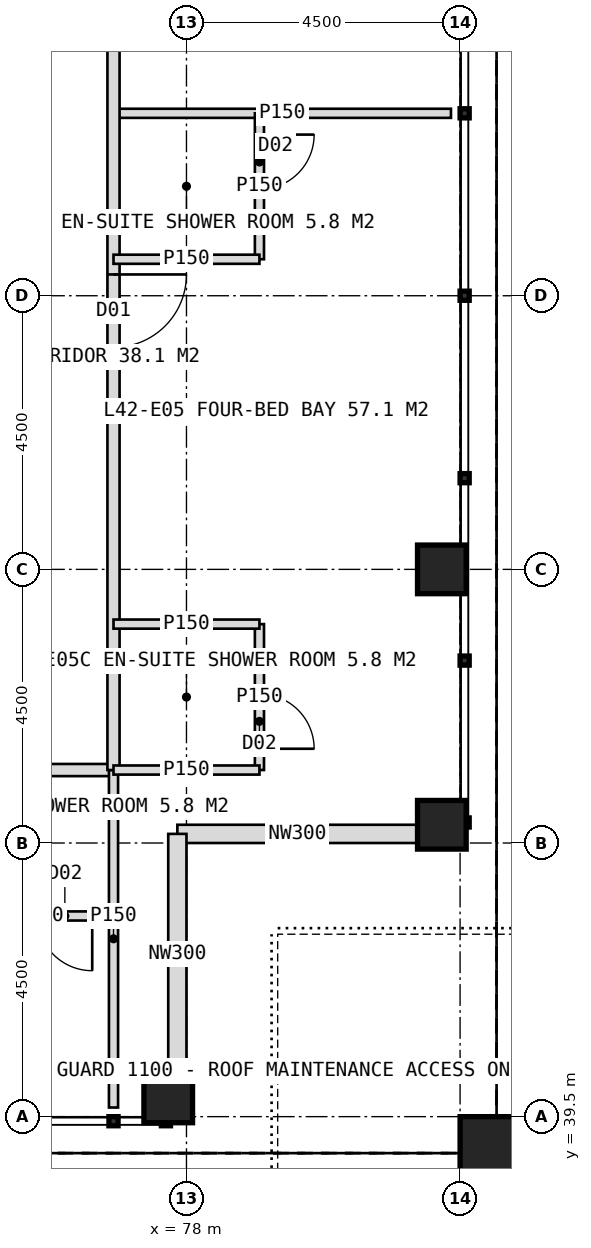
"""IFC4 building model, lengths in metres.
Left out: names, types, materials, properties, quantities, classifications, styles, units other than length and angle.
Written with IfcOpenShell. Run it as: python <this file> out.ifc"""

import sys

from ifc_helpers import new_model, si_unit, direction, frame, frame_2d, origin, origin_2d, place, context, subcontext, project, spatial, rectangle, hollow_rectangle, extrude, element, fill, save


model = new_model("IFC4")
c1 = context("Model", 3, precision=1e-05, world=origin(), true_north=direction((0.0, 1.0)))
c2 = subcontext(c1, "Body", "Model", "MODEL_VIEW")
j1 = project(units=[si_unit("LENGTHUNIT", "METRE"), si_unit("PLANEANGLEUNIT", "RADIAN")], contexts=[c1])
p1 = place(None, origin())
s1 = spatial("IfcSite", under=j1, at=p1, CompositionType="ELEMENT")
p2 = place(p1, origin())
s2 = spatial("IfcBuilding", under=s1, at=p2, CompositionType="ELEMENT")
p3 = place(p2, frame((0.0, 0.0, 177.0)))
s3 = spatial("IfcBuildingStorey", under=s2, at=p3, CompositionType="ELEMENT", Elevation=177.0)
for number, where, z_axis, x_axis in (
    (1, (82.2, 44.3, 0.0), (0.0, 0.0, 1.0), (1.0, 0.0, 0.0)),
    (2, (82.2, 48.5, 0.0), (0.0, 0.0, 1.0), (1.0, 0.0, 0.0)),
    (3, (77.7, 39.8, 0.0), (0.0, 0.0, 1.0), (1.0, 0.0, 0.0)),
):
    element("IfcColumn", number, at=place(p3, frame(where, z_axis=z_axis, x_axis=x_axis)), inside=s3, PredefinedType="COLUMN", context=c2, shape_type="SweptSolid", body=[
        extrude(hollow_rectangle(XDim=0.8, YDim=0.8, WallThickness=0.08, at=origin_2d()), origin(), (0.0, 0.0, 1.0), 4.0),
    ])
p4 = place(p3, frame((83.1, 38.9, 2.0), z_axis=(0.0, 0.0, 1.0), x_axis=(1.0, 0.0, 0.0)))
e4 = element("IfcColumn", 4, at=p4, inside=s3, PredefinedType="COLUMN", context=c2, shape_type="SweptSolid", body=[
    extrude(hollow_rectangle(XDim=1.2, YDim=1.2, WallThickness=0.07, at=origin_2d()), origin(), (0.0, 0.0, 1.0), 2.0),
])
for number, where, z_axis, x_axis in (
    (5, (81.8, 44.15, 0.0), (0.0, 0.0, 1.0), (-1.0, 0.0, 0.0)),
    (6, (77.85, 44.15, 0.0), (0.0, 0.0, 1.0), (0.0, -1.0, 0.0)),
):
    element("IfcWall", number, at=place(p3, frame(where, z_axis=z_axis, x_axis=x_axis)), inside=s3, PredefinedType="ELEMENTEDWALL", context=c2, shape_type="SweptSolid", body=[
        extrude(rectangle(XDim=3.95, YDim=0.3, at=frame_2d((1.975, 0.0))), origin(), (0.0, 0.0, 1.0), 2.85),
    ])
p5 = place(p3, frame((76.8, 45.2, 0.0), z_axis=(0.0, 0.0, 1.0), x_axis=(-1.0, 0.0, 0.0)))
e7 = element("IfcWall", 7, at=p5, inside=s3, PredefinedType="PARTITIONING", context=c2, shape_type="SweptSolid", body=[
    extrude(rectangle(XDim=33.6, YDim=0.2, at=frame_2d((16.8, 0.0))), origin(), (0.0, 0.0, 1.0), 3.75),
])
p6 = place(p5, frame((2.65, 0.0, 0.0)))
e8 = element("IfcOpeningElement", 8, at=p6, cuts=e7, PredefinedType="OPENING", context=c2, shape_type="SweptSolid", body=[
    extrude(rectangle(XDim=1.2, YDim=2.2, at=frame_2d((0.6, 1.1))), frame((0.0, 0.11, 0.0), z_axis=(0.0, -1.0, 0.0), x_axis=(1.0, 0.0, 0.0)), (0.0, 0.0, 1.0), 0.22),
])
p7 = place(p5, frame((14.05, 0.0, 0.0)))
e9 = element("IfcOpeningElement", 9, at=p7, cuts=e7, PredefinedType="OPENING", context=c2, shape_type="SweptSolid", body=[
    extrude(rectangle(XDim=1.2, YDim=2.2, at=frame_2d((0.6, 1.1))), frame((0.0, 0.11, 0.0), z_axis=(0.0, -1.0, 0.0), x_axis=(1.0, 0.0, 0.0)), (0.0, 0.0, 1.0), 0.22),
])
p8 = place(p5, frame((22.45, 0.0, 0.0)))
e10 = element("IfcOpeningElement", 10, at=p8, cuts=e7, PredefinedType="OPENING", context=c2, shape_type="SweptSolid", body=[
    extrude(rectangle(XDim=1.2, YDim=2.2, at=frame_2d((0.6, 1.1))), frame((0.0, 0.11, 0.0), z_axis=(0.0, -1.0, 0.0), x_axis=(1.0, 0.0, 0.0)), (0.0, 0.0, 1.0), 0.22),
])
p9 = place(p3, frame((76.8, 45.2, 0.0), z_axis=(0.0, 0.0, 1.0), x_axis=(0.0, -1.0, 0.0)))
e11 = element("IfcWall", 11, at=p9, inside=s3, PredefinedType="PARTITIONING", context=c2, shape_type="SweptSolid", body=[
    extrude(rectangle(XDim=5.55, YDim=0.15, at=frame_2d((2.775, 0.0))), origin(), (0.0, 0.0, 1.0), 3.75),
])
p10 = place(p3, frame((76.8, 42.8, 0.0), z_axis=(0.0, 0.0, 1.0), x_axis=(-1.0, 0.0, 0.0)))
e12 = element("IfcWall", 12, at=p10, inside=s3, PredefinedType="PARTITIONING", context=c2, shape_type="SweptSolid", body=[
    extrude(rectangle(XDim=2.4, YDim=0.15, at=frame_2d((1.2, 0.0))), origin(), (0.0, 0.0, 1.0), 3.75),
])
p11 = place(p10, frame((0.35, 0.0, 0.0)))
e13 = element("IfcOpeningElement", 13, at=p11, cuts=e12, PredefinedType="OPENING", context=c2, shape_type="SweptSolid", body=[
    extrude(rectangle(XDim=0.9, YDim=2.1, at=frame_2d((0.45, 1.05))), frame((0.0, 0.085, 0.0), z_axis=(0.0, -1.0, 0.0), x_axis=(1.0, 0.0, 0.0)), (0.0, 0.0, 1.0), 0.17),
])
p12 = place(p3, frame((76.8, 56.0, 0.0), z_axis=(0.0, 0.0, 1.0), x_axis=(1.0, 0.0, 0.0)))
e14 = element("IfcWall", 14, at=p12, inside=s3, PredefinedType="PARTITIONING", context=c2, shape_type="SweptSolid", body=[
    extrude(rectangle(XDim=5.55, YDim=0.15, at=frame_2d((2.775, 0.0))), origin(), (0.0, 0.0, 1.0), 3.75),
])
p13 = place(p3, frame((76.8, 78.8, 0.0), z_axis=(0.0, 0.0, 1.0), x_axis=(0.0, -1.0, 0.0)))
e15 = element("IfcWall", 15, at=p13, inside=s3, PredefinedType="PARTITIONING", context=c2, shape_type="SweptSolid", body=[
    extrude(rectangle(XDim=33.6, YDim=0.2, at=frame_2d((16.8, 0.0))), origin(), (0.0, 0.0, 1.0), 3.75),
])
p14 = place(p13, frame((2.65, 0.0, 0.0)))
e16 = element("IfcOpeningElement", 16, at=p14, cuts=e15, PredefinedType="OPENING", context=c2, shape_type="SweptSolid", body=[
    extrude(rectangle(XDim=1.2, YDim=2.2, at=frame_2d((0.6, 1.1))), frame((0.0, 0.11, 0.0), z_axis=(0.0, -1.0, 0.0), x_axis=(1.0, 0.0, 0.0)), (0.0, 0.0, 1.0), 0.22),
])
p15 = place(p13, frame((7.45, 0.0, 0.0)))
e17 = element("IfcOpeningElement", 17, at=p15, cuts=e15, PredefinedType="OPENING", context=c2, shape_type="SweptSolid", body=[
    extrude(rectangle(XDim=1.2, YDim=2.2, at=frame_2d((0.6, 1.1))), frame((0.0, 0.11, 0.0), z_axis=(0.0, -1.0, 0.0), x_axis=(1.0, 0.0, 0.0)), (0.0, 0.0, 1.0), 0.22),
])
p16 = place(p13, frame((13.45, 0.0, 0.0)))
e18 = element("IfcOpeningElement", 18, at=p16, cuts=e15, PredefinedType="OPENING", context=c2, shape_type="SweptSolid", body=[
    extrude(rectangle(XDim=1.2, YDim=2.2, at=frame_2d((0.6, 1.1))), frame((0.0, 0.11, 0.0), z_axis=(0.0, -1.0, 0.0), x_axis=(1.0, 0.0, 0.0)), (0.0, 0.0, 1.0), 0.22),
])
p17 = place(p13, frame((19.45, 0.0, 0.0)))
e19 = element("IfcOpeningElement", 19, at=p17, cuts=e15, PredefinedType="OPENING", context=c2, shape_type="SweptSolid", body=[
    extrude(rectangle(XDim=1.2, YDim=2.2, at=frame_2d((0.6, 1.1))), frame((0.0, 0.11, 0.0), z_axis=(0.0, -1.0, 0.0), x_axis=(1.0, 0.0, 0.0)), (0.0, 0.0, 1.0), 0.22),
])
p18 = place(p13, frame((25.45, 0.0, 0.0)))
e20 = element("IfcOpeningElement", 20, at=p18, cuts=e15, PredefinedType="OPENING", context=c2, shape_type="SweptSolid", body=[
    extrude(rectangle(XDim=1.2, YDim=2.2, at=frame_2d((0.6, 1.1))), frame((0.0, 0.11, 0.0), z_axis=(0.0, -1.0, 0.0), x_axis=(1.0, 0.0, 0.0)), (0.0, 0.0, 1.0), 0.22),
])
p19 = place(p3, frame((79.2, 56.0, 0.0), z_axis=(0.0, 0.0, 1.0), x_axis=(0.0, -1.0, 0.0)))
e21 = element("IfcWall", 21, at=p19, inside=s3, PredefinedType="PARTITIONING", context=c2, shape_type="SweptSolid", body=[
    extrude(rectangle(XDim=2.4, YDim=0.15, at=frame_2d((1.2, 0.0))), origin(), (0.0, 0.0, 1.0), 3.75),
])
p20 = place(p19, frame((0.35, 0.0, 0.0)))
e22 = element("IfcOpeningElement", 22, at=p20, cuts=e21, PredefinedType="OPENING", context=c2, shape_type="SweptSolid", body=[
    extrude(rectangle(XDim=0.9, YDim=2.1, at=frame_2d((0.45, 1.05))), frame((0.0, 0.085, 0.0), z_axis=(0.0, -1.0, 0.0), x_axis=(1.0, 0.0, 0.0)), (0.0, 0.0, 1.0), 0.17),
])
p21 = place(p3, frame((76.8, 53.6, 0.0), z_axis=(0.0, 0.0, 1.0), x_axis=(1.0, 0.0, 0.0)))
e23 = element("IfcWall", 23, at=p21, inside=s3, PredefinedType="PARTITIONING", context=c2, shape_type="SweptSolid", body=[
    extrude(rectangle(XDim=2.4, YDim=0.15, at=frame_2d((1.2, 0.0))), origin(), (0.0, 0.0, 1.0), 3.75),
])
p22 = place(p3, frame((79.2, 47.6, 0.0), z_axis=(0.0, 0.0, 1.0), x_axis=(0.0, -1.0, 0.0)))
e24 = element("IfcWall", 24, at=p22, inside=s3, PredefinedType="PARTITIONING", context=c2, shape_type="SweptSolid", body=[
    extrude(rectangle(XDim=2.4, YDim=0.15, at=frame_2d((1.2, 0.0))), origin(), (0.0, 0.0, 1.0), 3.75),
])
p23 = place(p22, frame((1.15, 0.0, 0.0)))
e25 = element("IfcOpeningElement", 25, at=p23, cuts=e24, PredefinedType="OPENING", context=c2, shape_type="SweptSolid", body=[
    extrude(rectangle(XDim=0.9, YDim=2.1, at=frame_2d((0.45, 1.05))), frame((0.0, 0.085, 0.0), z_axis=(0.0, -1.0, 0.0), x_axis=(1.0, 0.0, 0.0)), (0.0, 0.0, 1.0), 0.17),
])
for number, where, z_axis, x_axis in (
    (26, (76.8, 47.6, 0.0), (0.0, 0.0, 1.0), (1.0, 0.0, 0.0)),
    (27, (76.8, 45.2, 0.0), (0.0, 0.0, 1.0), (1.0, 0.0, 0.0)),
):
    element("IfcWall", number, at=place(p3, frame(where, z_axis=z_axis, x_axis=x_axis)), inside=s3, PredefinedType="PARTITIONING", context=c2, shape_type="SweptSolid", body=[
        extrude(rectangle(XDim=2.4, YDim=0.15, at=frame_2d((1.2, 0.0))), origin(), (0.0, 0.0, 1.0), 3.75),
    ])
p24 = place(p11, origin())
e28 = element("IfcDoor", 28, at=p24, inside=s3, OperationType="SINGLE_SWING_LEFT", PredefinedType="DOOR", context=c2, shape_type="SweptSolid", body=[
    extrude(rectangle(XDim=0.9, YDim=2.1, at=frame_2d((0.45, 1.05))), frame((0.0, 0.025, 0.0), z_axis=(0.0, -1.0, 0.0), x_axis=(1.0, 0.0, 0.0)), (0.0, 0.0, 1.0), 0.05),
])
fill(e13, e28)
p25 = place(p18, origin())
e29 = element("IfcDoor", 29, at=p25, inside=s3, OperationType="SINGLE_SWING_LEFT", PredefinedType="DOOR", context=c2, shape_type="SweptSolid", body=[
    extrude(rectangle(XDim=1.2, YDim=2.2, at=frame_2d((0.6, 1.1))), frame((0.0, 0.025, 0.0), z_axis=(0.0, -1.0, 0.0), x_axis=(1.0, 0.0, 0.0)), (0.0, 0.0, 1.0), 0.05),
])
fill(e20, e29)
p26 = place(p20, origin())
e30 = element("IfcDoor", 30, at=p26, inside=s3, OperationType="SINGLE_SWING_LEFT", PredefinedType="DOOR", context=c2, shape_type="SweptSolid", body=[
    extrude(rectangle(XDim=0.9, YDim=2.1, at=frame_2d((0.45, 1.05))), frame((0.0, 0.025, 0.0), z_axis=(0.0, -1.0, 0.0), x_axis=(1.0, 0.0, 0.0)), (0.0, 0.0, 1.0), 0.05),
])
fill(e22, e30)
p27 = place(p23, origin())
e31 = element("IfcDoor", 31, at=p27, inside=s3, OperationType="SINGLE_SWING_RIGHT", PredefinedType="DOOR", context=c2, shape_type="SweptSolid", body=[
    extrude(rectangle(XDim=0.9, YDim=2.1, at=frame_2d((0.45, 1.05))), frame((0.0, 0.025, 0.0), z_axis=(0.0, -1.0, 0.0), x_axis=(1.0, 0.0, 0.0)), (0.0, 0.0, 1.0), 0.05),
])
fill(e25, e31)
save(model, sys.argv[1])
